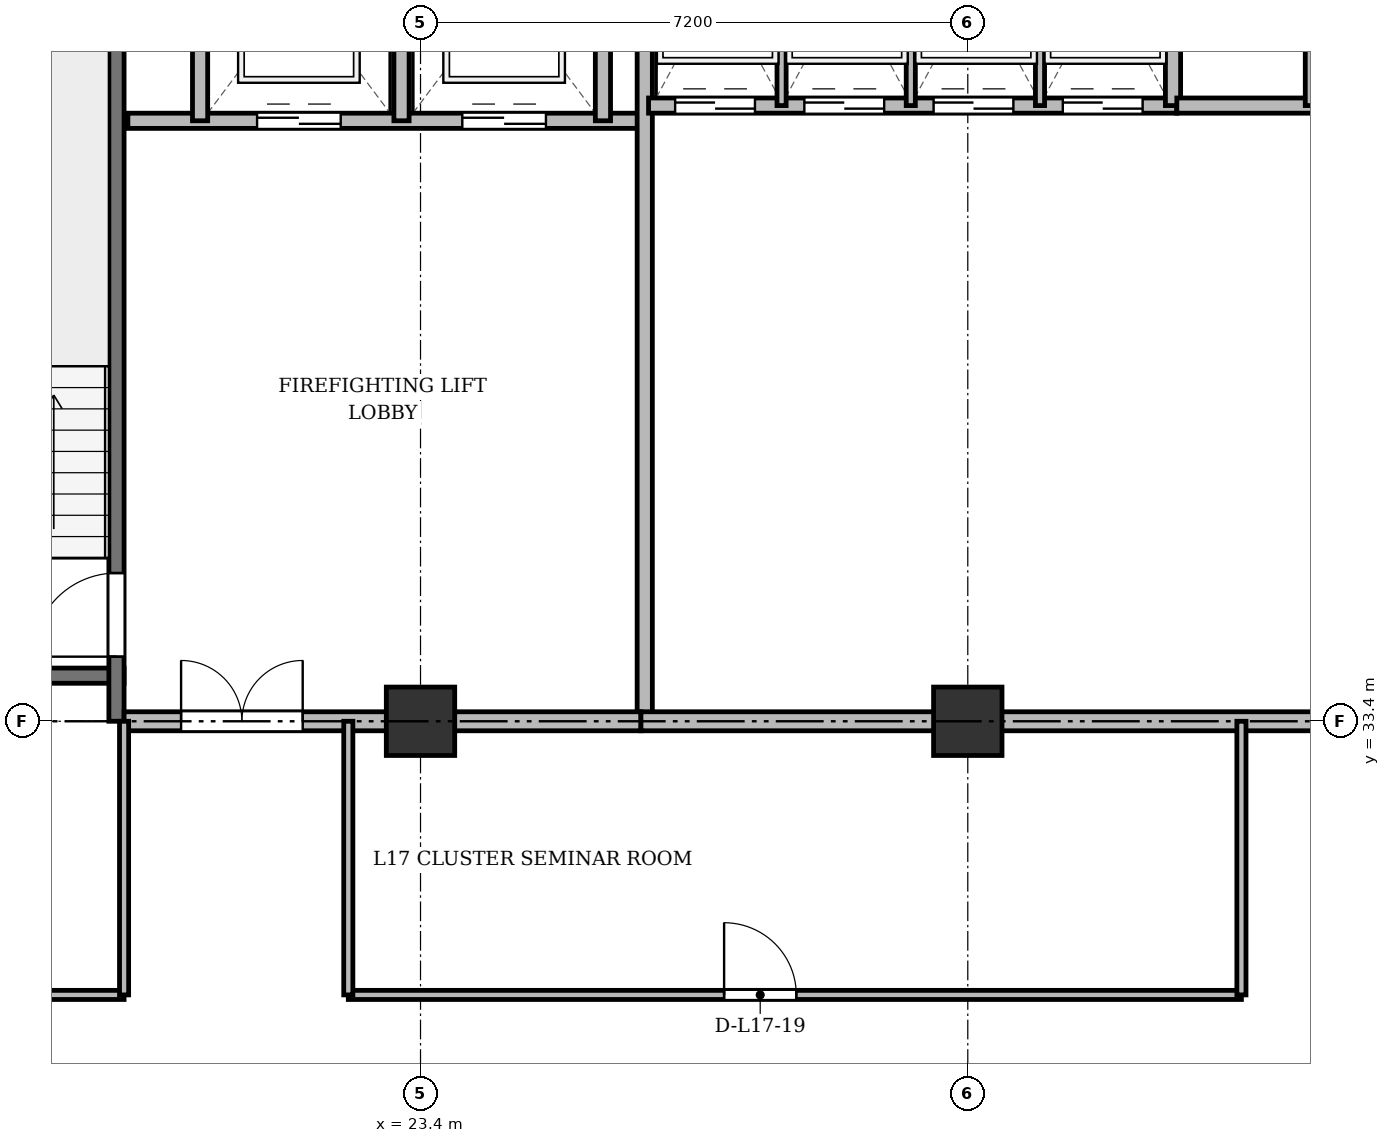
"""IFC4 building model, lengths in metres.
Left out: names, types, materials, properties, quantities, classifications, styles, units other than length and angle.
Written with IfcOpenShell. Run it as: python <this file> out.ifc"""

import sys

from ifc_helpers import new_model, si_unit, direction, frame, frame_2d, origin, origin_2d, place, context, subcontext, project, spatial, rectangle, extrude, source, transform, mapped, element, fill, save


model = new_model("IFC4")
c1 = context("Model", 3, precision=1e-05, world=origin(), true_north=direction((0.0, 1.0)))
c2 = subcontext(c1, "Body", "Model", "MODEL_VIEW")
j1 = project(units=[si_unit("LENGTHUNIT", "METRE"), si_unit("PLANEANGLEUNIT", "RADIAN")], contexts=[c1])
p1 = place(None, origin())
s1 = spatial("IfcSite", under=j1, at=p1, CompositionType="ELEMENT")
p2 = place(p1, origin())
s2 = spatial("IfcBuilding", under=s1, at=p2, CompositionType="ELEMENT")
p3 = place(p2, frame((0.0, 0.0, 66.7)))
s3 = spatial("IfcBuildingStorey", under=s2, at=p3, CompositionType="ELEMENT", Elevation=66.7)
m1 = source(origin(), c2, "Body", "SweptSolid", [
    extrude(rectangle(XDim=0.9, YDim=0.9, at=origin_2d()), origin(), (0.0, 0.0, 1.0), 3.6),
])
for number, where, z_axis, x_axis in (
    (1, (23.4, 33.4, 0.0), (0.0, 0.0, 1.0), (1.0, 0.0, 0.0)),
    (2, (30.6, 33.4, 0.0), (0.0, 0.0, 1.0), (1.0, 0.0, 0.0)),
):
    element("IfcColumn", number, at=place(p3, frame(where, z_axis=z_axis, x_axis=x_axis)), inside=s3, PredefinedType="COLUMN", context=c2, shape_type="MappedRepresentation", body=[
        mapped(m1, transform((0.0, 0.0, 0.0), x_axis=(1.0, 0.0, 0.0), y_axis=(0.0, 1.0, 0.0), z_axis=(0.0, 0.0, 1.0), scale=1.0)),
    ])
p4 = place(p3, frame((16.1, 34.0, 0.0), z_axis=(0.0, 0.0, 1.0), x_axis=(1.0, 0.0, 0.0)))
e3 = element("IfcWall", 3, at=p4, inside=s3, PredefinedType="SHEAR", context=c2, shape_type="SweptSolid", body=[
    extrude(rectangle(XDim=3.4, YDim=0.2, at=frame_2d((1.7, 0.0))), origin(), (0.0, 0.0, 1.0), 3.34),
])
p5 = place(p3, frame((19.4, 33.4, 0.0), z_axis=(0.0, 0.0, 1.0), x_axis=(0.0, 1.0, 0.0)))
e4 = element("IfcWall", 4, at=p5, inside=s3, PredefinedType="SHEAR", context=c2, shape_type="SweptSolid", body=[
    extrude(rectangle(XDim=11.1, YDim=0.2, at=frame_2d((5.55, 0.0))), origin(), (0.0, 0.0, 1.0), 3.34),
])
p6 = place(p5, frame((0.85, 0.0, 0.0)))
e5 = element("IfcOpeningElement", 5, at=p6, cuts=e4, PredefinedType="OPENING", context=c2, shape_type="SweptSolid", body=[
    extrude(rectangle(XDim=1.1, YDim=2.15, at=frame_2d((0.55, 1.075))), frame((0.0, 0.11, 0.0), z_axis=(0.0, -1.0, 0.0), x_axis=(1.0, 0.0, 0.0)), (0.0, 0.0, 1.0), 0.22),
])
p7 = place(p3, frame((19.55, 41.3, 0.0), z_axis=(0.0, 0.0, 1.0), x_axis=(1.0, 0.0, 0.0)))
e6 = element("IfcWall", 6, at=p7, inside=s3, PredefinedType="SOLIDWALL", context=c2, shape_type="SweptSolid", body=[
    extrude(rectangle(XDim=6.75, YDim=0.2, at=frame_2d((3.375, 0.0))), origin(), (0.0, 0.0, 1.0), 3.34),
])
p8 = place(p7, frame((1.7, 0.0, 0.0)))
e7 = element("IfcOpeningElement", 7, at=p8, cuts=e6, PredefinedType="OPENING", context=c2, shape_type="SweptSolid", body=[
    extrude(rectangle(XDim=1.1, YDim=2.15, at=frame_2d((0.55, 1.075))), frame((0.0, 0.11, 0.0), z_axis=(0.0, -1.0, 0.0), x_axis=(1.0, 0.0, 0.0)), (0.0, 0.0, 1.0), 0.22),
])
p9 = place(p7, frame((4.4, 0.0, 0.0)))
e8 = element("IfcOpeningElement", 8, at=p9, cuts=e6, PredefinedType="OPENING", context=c2, shape_type="SweptSolid", body=[
    extrude(rectangle(XDim=1.1, YDim=2.15, at=frame_2d((0.55, 1.075))), frame((0.0, 0.11, 0.0), z_axis=(0.0, -1.0, 0.0), x_axis=(1.0, 0.0, 0.0)), (0.0, 0.0, 1.0), 0.22),
])
for number, where, z_axis, x_axis in (
    (9, (20.5, 41.3, 0.0), (0.0, 0.0, 1.0), (0.0, 1.0, 0.0)),
    (10, (23.15, 41.3, 0.0), (0.0, 0.0, 1.0), (0.0, 1.0, 0.0)),
    (11, (25.8, 41.3, 0.0), (0.0, 0.0, 1.0), (0.0, 1.0, 0.0)),
):
    element("IfcWall", number, at=place(p3, frame(where, z_axis=z_axis, x_axis=x_axis)), inside=s3, PredefinedType="SOLIDWALL", context=c2, shape_type="SweptSolid", body=[
        extrude(rectangle(XDim=3.4, YDim=0.2, at=frame_2d((1.7, 0.0))), origin(), (0.0, 0.0, 1.0), 3.34),
    ])
p10 = place(p3, frame((26.35, 33.4, 0.0), z_axis=(0.0, 0.0, 1.0), x_axis=(0.0, 1.0, 0.0)))
e12 = element("IfcWall", 12, at=p10, inside=s3, PredefinedType="SOLIDWALL", context=c2, shape_type="SweptSolid", body=[
    extrude(rectangle(XDim=11.3, YDim=0.2, at=frame_2d((5.65, 0.0))), origin(), (0.0, 0.0, 1.0), 2.69),
])
p11 = place(p3, frame((19.5, 33.4, 0.0), z_axis=(0.0, 0.0, 1.0), x_axis=(1.0, 0.0, 0.0)))
e13 = element("IfcWall", 13, at=p11, inside=s3, PredefinedType="PARTITIONING", context=c2, shape_type="SweptSolid", body=[
    extrude(rectangle(XDim=6.8, YDim=0.25, at=frame_2d((3.4, 0.0))), origin(), (0.0, 0.0, 1.0), 2.69),
])
p12 = place(p11, frame((0.75, 0.0, 0.0)))
e14 = element("IfcOpeningElement", 14, at=p12, cuts=e13, PredefinedType="OPENING", context=c2, shape_type="SweptSolid", body=[
    extrude(rectangle(XDim=1.6, YDim=2.2, at=frame_2d((0.8, 1.1))), frame((0.0, 0.135, 0.0), z_axis=(0.0, -1.0, 0.0), x_axis=(1.0, 0.0, 0.0)), (0.0, 0.0, 1.0), 0.27),
])
p13 = place(p3, frame((26.4, 41.5, 0.0), z_axis=(0.0, 0.0, 1.0), x_axis=(1.0, 0.0, 0.0)))
e15 = element("IfcWall", 15, at=p13, inside=s3, PredefinedType="SOLIDWALL", context=c2, shape_type="SweptSolid", body=[
    extrude(rectangle(XDim=6.95, YDim=0.2, at=frame_2d((3.475, 0.0))), origin(), (0.0, 0.0, 1.0), 3.34),
])
p14 = place(p13, frame((0.35, 0.0, 0.0)))
e16 = element("IfcOpeningElement", 16, at=p14, cuts=e15, PredefinedType="OPENING", context=c2, shape_type="SweptSolid", body=[
    extrude(rectangle(XDim=1.05, YDim=2.15, at=frame_2d((0.525, 1.075))), frame((0.0, 0.11, 0.0), z_axis=(0.0, -1.0, 0.0), x_axis=(1.0, 0.0, 0.0)), (0.0, 0.0, 1.0), 0.22),
])
p15 = place(p13, frame((2.05, 0.0, 0.0)))
e17 = element("IfcOpeningElement", 17, at=p15, cuts=e15, PredefinedType="OPENING", context=c2, shape_type="SweptSolid", body=[
    extrude(rectangle(XDim=1.05, YDim=2.15, at=frame_2d((0.525, 1.075))), frame((0.0, 0.11, 0.0), z_axis=(0.0, -1.0, 0.0), x_axis=(1.0, 0.0, 0.0)), (0.0, 0.0, 1.0), 0.22),
])
p16 = place(p13, frame((3.75, 0.0, 0.0)))
e18 = element("IfcOpeningElement", 18, at=p16, cuts=e15, PredefinedType="OPENING", context=c2, shape_type="SweptSolid", body=[
    extrude(rectangle(XDim=1.05, YDim=2.15, at=frame_2d((0.525, 1.075))), frame((0.0, 0.11, 0.0), z_axis=(0.0, -1.0, 0.0), x_axis=(1.0, 0.0, 0.0)), (0.0, 0.0, 1.0), 0.22),
])
p17 = place(p13, frame((5.45, 0.0, 0.0)))
e19 = element("IfcOpeningElement", 19, at=p17, cuts=e15, PredefinedType="OPENING", context=c2, shape_type="SweptSolid", body=[
    extrude(rectangle(XDim=1.05, YDim=2.15, at=frame_2d((0.525, 1.075))), frame((0.0, 0.11, 0.0), z_axis=(0.0, -1.0, 0.0), x_axis=(1.0, 0.0, 0.0)), (0.0, 0.0, 1.0), 0.22),
])
p18 = place(p3, frame((33.3, 41.5, 0.0), z_axis=(0.0, 0.0, 1.0), x_axis=(0.0, 1.0, 0.0)))
e20 = element("IfcWall", 20, at=p18, inside=s3, PredefinedType="SOLIDWALL", context=c2, shape_type="SweptSolid", body=[
    extrude(rectangle(XDim=3.2, YDim=0.2, at=frame_2d((1.6, 0.0))), origin(), (0.0, 0.0, 1.0), 3.34),
])
for number, where, z_axis, x_axis in (
    (21, (28.15, 41.5, 0.0), (0.0, 0.0, 1.0), (0.0, 1.0, 0.0)),
    (22, (29.85, 41.5, 0.0), (0.0, 0.0, 1.0), (0.0, 1.0, 0.0)),
    (23, (31.55, 41.5, 0.0), (0.0, 0.0, 1.0), (0.0, 1.0, 0.0)),
):
    element("IfcWall", number, at=place(p3, frame(where, z_axis=z_axis, x_axis=x_axis)), inside=s3, PredefinedType="PARTITIONING", context=c2, shape_type="SweptSolid", body=[
        extrude(rectangle(XDim=3.2, YDim=0.12, at=frame_2d((1.6, 0.0))), origin(), (0.0, 0.0, 1.0), 3.34),
    ])
p19 = place(p3, frame((33.35, 41.5, 0.0), z_axis=(0.0, 0.0, 1.0), x_axis=(1.0, 0.0, 0.0)))
e24 = element("IfcWall", 24, at=p19, inside=s3, PredefinedType="SOLIDWALL", context=c2, shape_type="SweptSolid", body=[
    extrude(rectangle(XDim=6.9, YDim=0.2, at=frame_2d((3.45, 0.0))), origin(), (0.0, 0.0, 1.0), 3.34),
])
p20 = place(p3, frame((35.1, 41.5, 0.0), z_axis=(0.0, 0.0, 1.0), x_axis=(0.0, 1.0, 0.0)))
e25 = element("IfcWall", 25, at=p20, inside=s3, PredefinedType="PARTITIONING", context=c2, shape_type="SweptSolid", body=[
    extrude(rectangle(XDim=3.2, YDim=0.12, at=frame_2d((1.6, 0.0))), origin(), (0.0, 0.0, 1.0), 3.34),
])
p21 = place(p3, frame((26.3, 33.4, 0.0), z_axis=(0.0, 0.0, 1.0), x_axis=(1.0, 0.0, 0.0)))
e26 = element("IfcWall", 26, at=p21, inside=s3, PredefinedType="PARTITIONING", context=c2, shape_type="SweptSolid", body=[
    extrude(rectangle(XDim=20.85, YDim=0.25, at=frame_2d((10.425, 0.0))), origin(), (0.0, 0.0, 1.0), 2.69),
])
p22 = place(p21, frame((9.2, 0.0, 0.0)))
e27 = element("IfcOpeningElement", 27, at=p22, cuts=e26, PredefinedType="OPENING", context=c2, shape_type="SweptSolid", body=[
    extrude(rectangle(XDim=1.6, YDim=2.2, at=frame_2d((0.8, 1.1))), frame((0.0, 0.135, 0.0), z_axis=(0.0, -1.0, 0.0), x_axis=(1.0, 0.0, 0.0)), (0.0, 0.0, 1.0), 0.27),
])
p23 = place(p3, frame((4.75, 29.8, 0.0), z_axis=(0.0, 0.0, 1.0), x_axis=(1.0, 0.0, 0.0)))
e28 = element("IfcWall", 28, at=p23, inside=s3, PredefinedType="PARTITIONING", context=c2, shape_type="SweptSolid", body=[
    extrude(rectangle(XDim=14.75, YDim=0.12, at=frame_2d((7.375, 0.0))), origin(), (0.0, 0.0, 1.0), 2.752),
])
p24 = place(p23, frame((6.9, 0.0, 0.0)))
e29 = element("IfcOpeningElement", 29, at=p24, cuts=e28, PredefinedType="OPENING", context=c2, shape_type="SweptSolid", body=[
    extrude(rectangle(XDim=0.95, YDim=2.15, at=frame_2d((0.475, 1.075))), frame((0.0, 0.07, 0.0), z_axis=(0.0, -1.0, 0.0), x_axis=(1.0, 0.0, 0.0)), (0.0, 0.0, 1.0), 0.14),
])
p25 = place(p3, frame((22.45, 29.8, 0.0), z_axis=(0.0, 0.0, 1.0), x_axis=(1.0, 0.0, 0.0)))
e30 = element("IfcWall", 30, at=p25, inside=s3, PredefinedType="PARTITIONING", context=c2, shape_type="SweptSolid", body=[
    extrude(rectangle(XDim=11.75, YDim=0.12, at=frame_2d((5.875, 0.0))), origin(), (0.0, 0.0, 1.0), 2.752),
])
p26 = place(p25, frame((4.944, 0.0, 0.0)))
e31 = element("IfcOpeningElement", 31, at=p26, cuts=e30, PredefinedType="OPENING", context=c2, shape_type="SweptSolid", body=[
    extrude(rectangle(XDim=0.95, YDim=2.15, at=frame_2d((0.475, 1.075))), frame((0.0, 0.07, 0.0), z_axis=(0.0, -1.0, 0.0), x_axis=(1.0, 0.0, 0.0)), (0.0, 0.0, 1.0), 0.14),
])
for number, where, z_axis, x_axis in (
    (32, (19.5, 29.8, 0.0), (0.0, 0.0, 1.0), (0.0, 1.0, 0.0)),
    (33, (22.45, 29.8, 0.0), (0.0, 0.0, 1.0), (0.0, 1.0, 0.0)),
    (34, (34.2, 29.8, 0.0), (0.0, 0.0, 1.0), (0.0, 1.0, 0.0)),
):
    element("IfcWall", number, at=place(p3, frame(where, z_axis=z_axis, x_axis=x_axis)), inside=s3, PredefinedType="PARTITIONING", context=c2, shape_type="SweptSolid", body=[
        extrude(rectangle(XDim=3.6, YDim=0.12, at=frame_2d((1.8, 0.0))), origin(), (0.0, 0.0, 1.0), 2.69),
    ])
m2 = source(origin(), c2, "Body", "SweptSolid", [
    extrude(rectangle(XDim=1.1, YDim=2.15, at=frame_2d((0.55, 1.075))), frame((0.0, 0.025, 0.0), z_axis=(0.0, -1.0, 0.0), x_axis=(1.0, 0.0, 0.0)), (0.0, 0.0, 1.0), 0.05),
])
p27 = place(p6, origin())
e35 = element("IfcDoor", 35, at=p27, inside=s3, OperationType="SINGLE_SWING_LEFT", PredefinedType="DOOR", context=c2, shape_type="MappedRepresentation", body=[
    mapped(m2, transform((0.0, 0.0, 0.0), x_axis=(1.0, 0.0, 0.0), y_axis=(0.0, 1.0, 0.0), z_axis=(0.0, 0.0, 1.0), scale=1.0)),
])
fill(e5, e35)
p28 = place(p8, origin())
e36 = element("IfcDoor", 36, at=p28, inside=s3, OperationType="DOUBLE_DOOR_SLIDING", PredefinedType="DOOR", context=c2, shape_type="MappedRepresentation", body=[
    mapped(m2, transform((0.0, 0.0, 0.0), x_axis=(1.0, 0.0, 0.0), y_axis=(0.0, 1.0, 0.0), z_axis=(0.0, 0.0, 1.0), scale=1.0)),
])
fill(e7, e36)
p29 = place(p9, origin())
e37 = element("IfcDoor", 37, at=p29, inside=s3, OperationType="DOUBLE_DOOR_SLIDING", PredefinedType="DOOR", context=c2, shape_type="MappedRepresentation", body=[
    mapped(m2, transform((0.0, 0.0, 0.0), x_axis=(1.0, 0.0, 0.0), y_axis=(0.0, 1.0, 0.0), z_axis=(0.0, 0.0, 1.0), scale=1.0)),
])
fill(e8, e37)
m3 = source(origin(), c2, "Body", "SweptSolid", [
    extrude(rectangle(XDim=1.6, YDim=2.2, at=frame_2d((0.8, 1.1))), frame((0.0, 0.025, 0.0), z_axis=(0.0, -1.0, 0.0), x_axis=(1.0, 0.0, 0.0)), (0.0, 0.0, 1.0), 0.05),
])
p30 = place(p12, origin())
e38 = element("IfcDoor", 38, at=p30, inside=s3, OperationType="DOUBLE_DOOR_SINGLE_SWING", PredefinedType="DOOR", context=c2, shape_type="MappedRepresentation", body=[
    mapped(m3, transform((0.0, 0.0, 0.0), x_axis=(1.0, 0.0, 0.0), y_axis=(0.0, 1.0, 0.0), z_axis=(0.0, 0.0, 1.0), scale=1.0)),
])
fill(e14, e38)
m4 = source(origin(), c2, "Body", "SweptSolid", [
    extrude(rectangle(XDim=1.05, YDim=2.15, at=frame_2d((0.525, 1.075))), frame((0.0, 0.025, 0.0), z_axis=(0.0, -1.0, 0.0), x_axis=(1.0, 0.0, 0.0)), (0.0, 0.0, 1.0), 0.05),
])
p31 = place(p14, origin())
e39 = element("IfcDoor", 39, at=p31, inside=s3, OperationType="DOUBLE_DOOR_SLIDING", PredefinedType="DOOR", context=c2, shape_type="MappedRepresentation", body=[
    mapped(m4, transform((0.0, 0.0, 0.0), x_axis=(1.0, 0.0, 0.0), y_axis=(0.0, 1.0, 0.0), z_axis=(0.0, 0.0, 1.0), scale=1.0)),
])
fill(e16, e39)
p32 = place(p15, origin())
e40 = element("IfcDoor", 40, at=p32, inside=s3, OperationType="DOUBLE_DOOR_SLIDING", PredefinedType="DOOR", context=c2, shape_type="MappedRepresentation", body=[
    mapped(m4, transform((0.0, 0.0, 0.0), x_axis=(1.0, 0.0, 0.0), y_axis=(0.0, 1.0, 0.0), z_axis=(0.0, 0.0, 1.0), scale=1.0)),
])
fill(e17, e40)
p33 = place(p16, origin())
e41 = element("IfcDoor", 41, at=p33, inside=s3, OperationType="DOUBLE_DOOR_SLIDING", PredefinedType="DOOR", context=c2, shape_type="MappedRepresentation", body=[
    mapped(m4, transform((0.0, 0.0, 0.0), x_axis=(1.0, 0.0, 0.0), y_axis=(0.0, 1.0, 0.0), z_axis=(0.0, 0.0, 1.0), scale=1.0)),
])
fill(e18, e41)
p34 = place(p17, origin())
e42 = element("IfcDoor", 42, at=p34, inside=s3, OperationType="DOUBLE_DOOR_SLIDING", PredefinedType="DOOR", context=c2, shape_type="MappedRepresentation", body=[
    mapped(m4, transform((0.0, 0.0, 0.0), x_axis=(1.0, 0.0, 0.0), y_axis=(0.0, 1.0, 0.0), z_axis=(0.0, 0.0, 1.0), scale=1.0)),
])
fill(e19, e42)
m5 = source(origin(), c2, "Body", "SweptSolid", [
    extrude(rectangle(XDim=0.95, YDim=2.15, at=frame_2d((0.475, 1.075))), frame((0.0, 0.025, 0.0), z_axis=(0.0, -1.0, 0.0), x_axis=(1.0, 0.0, 0.0)), (0.0, 0.0, 1.0), 0.05),
])
p35 = place(p26, origin())
e43 = element("IfcDoor", 43, at=p35, inside=s3, OperationType="SINGLE_SWING_LEFT", PredefinedType="DOOR", context=c2, shape_type="MappedRepresentation", body=[
    mapped(m5, transform((0.0, 0.0, 0.0), x_axis=(1.0, 0.0, 0.0), y_axis=(0.0, 1.0, 0.0), z_axis=(0.0, 0.0, 1.0), scale=1.0)),
])
fill(e31, e43)
save(model, sys.argv[1])
